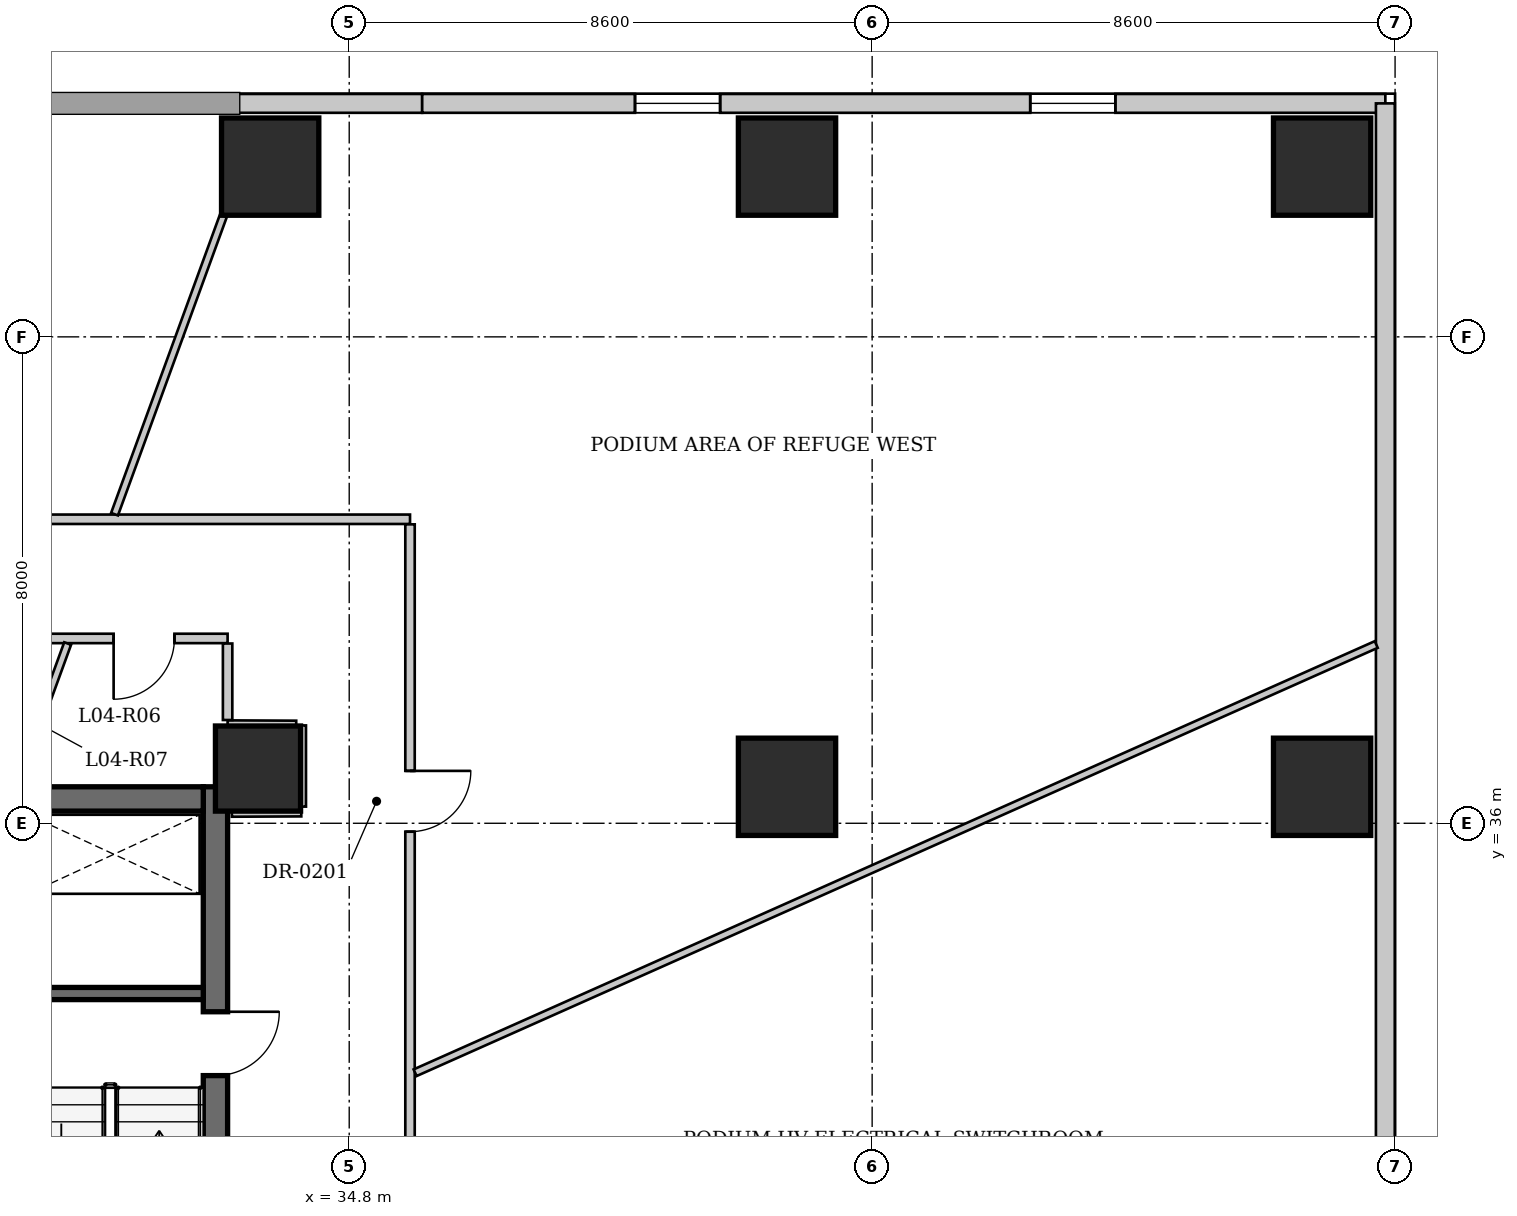
"""IFC4 building model, lengths in metres.
Left out: names, types, materials, properties, quantities, classifications, styles, units other than length and angle.
Written with IfcOpenShell. Run it as: python <this file> out.ifc"""

import sys

from ifc_helpers import new_model, si_unit, direction, frame, frame_2d, origin, origin_2d, place, context, subcontext, project, spatial, rectangle, extrude, source, transform, mapped, element, fill, save


model = new_model("IFC4")
c1 = context("Model", 3, precision=1e-05, world=origin(), true_north=direction((0.0, 1.0)))
c2 = subcontext(c1, "Body", "Model", "MODEL_VIEW")
j1 = project(units=[si_unit("LENGTHUNIT", "METRE"), si_unit("PLANEANGLEUNIT", "RADIAN")], contexts=[c1])
p1 = place(None, origin())
s1 = spatial("IfcSite", under=j1, at=p1, CompositionType="ELEMENT")
p2 = place(p1, origin())
s2 = spatial("IfcBuilding", under=s1, at=p2, CompositionType="ELEMENT")
p3 = place(p2, frame((0.0, 0.0, 19.0)))
s3 = spatial("IfcBuildingStorey", under=s2, at=p3, CompositionType="ELEMENT", Elevation=19.0)
for number, where, z_axis, x_axis in (
    (1, (50.8, 36.6, 0.0), (0.0, 0.0, 1.0), (1.0, 0.0, 0.0)),
    (2, (50.8, 46.8, 0.0), (0.0, 0.0, 1.0), (1.0, 0.0, 0.0)),
    (3, (33.5, 46.8, 0.0), (0.0, 0.0, 1.0), (1.0, 0.0, 0.0)),
    (4, (42.0, 46.8, 0.0), (0.0, 0.0, 1.0), (1.0, 0.0, 0.0)),
    (5, (42.0, 36.6, 0.0), (0.0, 0.0, 1.0), (1.0, 0.0, 0.0)),
):
    element("IfcColumn", number, at=place(p3, frame(where, z_axis=z_axis, x_axis=x_axis)), inside=s3, PredefinedType="COLUMN", context=c2, shape_type="SweptSolid", body=[
        extrude(rectangle(XDim=1.6, YDim=1.6, at=origin_2d()), origin(), (0.0, 0.0, 1.0), 4.55),
    ])
p4 = place(p3, frame((33.3, 36.9, 0.0), z_axis=(0.0, 0.0, 1.0), x_axis=(1.0, 0.0, 0.0)))
e6 = element("IfcColumn", 6, at=p4, inside=s3, PredefinedType="COLUMN", context=c2, shape_type="SweptSolid", body=[
    extrude(rectangle(XDim=1.4, YDim=1.4, at=origin_2d()), origin(), (0.0, 0.0, 1.0), 4.55),
])
p5 = place(p3, frame((18.0, 47.84, 0.0), z_axis=(0.0, 0.0, 1.0), x_axis=(1.0, 0.0, 0.0)))
e7 = element("IfcWall", 7, at=p5, inside=s3, PredefinedType="SOLIDWALL", context=c2, shape_type="SweptSolid", body=[
    extrude(rectangle(XDim=18.0, YDim=0.31, at=frame_2d((9.0, 0.0))), origin(), (0.0, 0.0, 1.0), 4.45),
])
p6 = place(p3, frame((36.0, 47.84, 0.0), z_axis=(0.0, 0.0, 1.0), x_axis=(1.0, 0.0, 0.0)))
e8 = element("IfcWall", 8, at=p6, inside=s3, PredefinedType="SOLIDWALL", context=c2, shape_type="SweptSolid", body=[
    extrude(rectangle(XDim=15.84, YDim=0.31, at=frame_2d((7.92, 0.0))), origin(), (0.0, 0.0, 1.0), 4.45),
])
p7 = place(p6, frame((3.5, 0.0, 0.95)))
e9 = element("IfcOpeningElement", 9, at=p7, cuts=e8, PredefinedType="OPENING", context=c2, shape_type="SweptSolid", body=[
    extrude(rectangle(XDim=1.4, YDim=2.2, at=frame_2d((0.7, 1.1))), frame((0.0, 0.165, 0.0), z_axis=(0.0, -1.0, 0.0), x_axis=(1.0, 0.0, 0.0)), (0.0, 0.0, 1.0), 0.33),
])
p8 = place(p6, frame((10.0, 0.0, 0.95)))
e10 = element("IfcOpeningElement", 10, at=p8, cuts=e8, PredefinedType="OPENING", context=c2, shape_type="SweptSolid", body=[
    extrude(rectangle(XDim=1.4, YDim=2.2, at=frame_2d((0.7, 1.1))), frame((0.0, 0.165, 0.0), z_axis=(0.0, -1.0, 0.0), x_axis=(1.0, 0.0, 0.0)), (0.0, 0.0, 1.0), 0.33),
])
p9 = place(p3, frame((51.84, 47.84, 0.0), z_axis=(0.0, 0.0, 1.0), x_axis=(0.0, -1.0, 0.0)))
e11 = element("IfcWall", 11, at=p9, inside=s3, PredefinedType="SOLIDWALL", context=c2, shape_type="SweptSolid", body=[
    extrude(rectangle(XDim=39.68, YDim=0.31, at=frame_2d((19.84, 0.0))), origin(), (0.0, 0.0, 1.0), 4.45),
])
p10 = place(p3, frame((32.6, 36.6, 0.0), z_axis=(0.0, 0.0, 1.0), x_axis=(0.0, -1.0, 0.0)))
e12 = element("IfcWall", 12, at=p10, inside=s3, PredefinedType="SHEAR", context=c2, shape_type="SweptSolid", body=[
    extrude(rectangle(XDim=10.8, YDim=0.4, at=frame_2d((5.4, 0.0))), origin(), (0.0, 0.0, 1.0), 5.0),
])
p11 = place(p10, frame((3.7, 0.0, 0.0)))
e13 = element("IfcOpeningElement", 13, at=p11, cuts=e12, PredefinedType="OPENING", context=c2, shape_type="SweptSolid", body=[
    extrude(rectangle(XDim=1.05, YDim=2.15, at=frame_2d((0.525, 1.075))), frame((0.0, 0.21, 0.0), z_axis=(0.0, -1.0, 0.0), x_axis=(1.0, 0.0, 0.0)), (0.0, 0.0, 1.0), 0.42),
])
p12 = place(p3, frame((19.6, 36.4, 0.0), z_axis=(0.0, 0.0, 1.0), x_axis=(1.0, 0.0, 0.0)))
e14 = element("IfcWall", 14, at=p12, inside=s3, PredefinedType="SHEAR", context=c2, shape_type="SweptSolid", body=[
    extrude(rectangle(XDim=12.8, YDim=0.4, at=frame_2d((6.4, 0.0))), origin(), (0.0, 0.0, 1.0), 5.0),
])
p13 = place(p3, frame((29.34, 33.2, 0.0), z_axis=(0.0, 0.0, 1.0), x_axis=(1.0, 0.0, 0.0)))
e15 = element("IfcWall", 15, at=p13, inside=s3, PredefinedType="SHEAR", context=c2, shape_type="SweptSolid", body=[
    extrude(rectangle(XDim=3.06, YDim=0.2, at=frame_2d((1.53, 0.0))), origin(), (0.0, 0.0, 1.0), 5.0),
])
p14 = place(p3, frame((32.8, 39.04, 0.0), z_axis=(0.0, 0.0, 1.0), x_axis=(-1.0, 0.0, 0.0)))
e16 = element("IfcWall", 16, at=p14, inside=s3, PredefinedType="PARTITIONING", context=c2, shape_type="SweptSolid", body=[
    extrude(rectangle(XDim=4.77, YDim=0.155, at=frame_2d((2.385, 0.0))), origin(), (0.0, 0.0, 1.0), 4.55),
])
p15 = place(p14, frame((0.875, 0.0, 0.0)))
e17 = element("IfcOpeningElement", 17, at=p15, cuts=e16, PredefinedType="OPENING", context=c2, shape_type="SweptSolid", body=[
    extrude(rectangle(XDim=1.0, YDim=2.15, at=frame_2d((0.5, 1.075))), frame((0.0, 0.087, 0.0), z_axis=(0.0, -1.0, 0.0), x_axis=(1.0, 0.0, 0.0)), (0.0, 0.0, 1.0), 0.175),
])
p16 = place(p14, frame((3.115, 0.0, 0.0)))
e18 = element("IfcOpeningElement", 18, at=p16, cuts=e16, PredefinedType="OPENING", context=c2, shape_type="SweptSolid", body=[
    extrude(rectangle(XDim=1.0, YDim=2.15, at=frame_2d((0.5, 1.075))), frame((0.0, 0.087, 0.0), z_axis=(0.0, -1.0, 0.0), x_axis=(1.0, 0.0, 0.0)), (0.0, 0.0, 1.0), 0.175),
])
p17 = place(p3, frame((21.6, 41.0, 0.0), z_axis=(0.0, 0.0, 1.0), x_axis=(1.0, 0.0, 0.0)))
e19 = element("IfcWall", 19, at=p17, inside=s3, PredefinedType="PARTITIONING", context=c2, shape_type="SweptSolid", body=[
    extrude(rectangle(XDim=14.2, YDim=0.155, at=frame_2d((7.1, 0.0))), origin(), (0.0, 0.0, 1.0), 4.55),
])
p18 = place(p17, frame((6.881, 0.0, 0.0)))
e20 = element("IfcOpeningElement", 20, at=p18, cuts=e19, PredefinedType="OPENING", context=c2, shape_type="SweptSolid", body=[
    extrude(rectangle(XDim=1.0, YDim=2.15, at=frame_2d((0.5, 1.075))), frame((0.0, 0.087, 0.0), z_axis=(0.0, -1.0, 0.0), x_axis=(1.0, 0.0, 0.0)), (0.0, 0.0, 1.0), 0.175),
])
p19 = place(p3, frame((35.8, 40.917, 0.0), z_axis=(0.0, 0.0, 1.0), x_axis=(0.0, -1.0, 0.0)))
e21 = element("IfcWall", 21, at=p19, inside=s3, PredefinedType="PARTITIONING", context=c2, shape_type="SweptSolid", body=[
    extrude(rectangle(XDim=14.796, YDim=0.155, at=frame_2d((7.398, 0.0))), origin(), (0.0, 0.0, 1.0), 4.55),
])
p20 = place(p19, frame((4.055, 0.0, 0.0)))
e22 = element("IfcOpeningElement", 22, at=p20, cuts=e21, PredefinedType="OPENING", context=c2, shape_type="SweptSolid", body=[
    extrude(rectangle(XDim=1.0, YDim=2.15, at=frame_2d((0.5, 1.075))), frame((0.0, 0.087, 0.0), z_axis=(0.0, -1.0, 0.0), x_axis=(1.0, 0.0, 0.0)), (0.0, 0.0, 1.0), 0.175),
])
p21 = place(p3, frame((32.87, 36.185, 0.0), z_axis=(0.0, 0.0, 1.0), x_axis=(0.999988932255, 0.00470482389, 0.0)))
e23 = element("IfcWall", 23, at=p21, inside=s3, PredefinedType="PARTITIONING", context=c2, shape_type="SweptSolid", body=[
    extrude(rectangle(XDim=1.142, YDim=0.155, at=frame_2d((0.571, 0.0))), origin(), (0.0, 0.0, 1.0), 4.55),
])
p22 = place(p3, frame((34.012, 36.274, 0.0), z_axis=(0.0, 0.0, 1.0), x_axis=(0.0, 1.0, 0.0)))
e24 = element("IfcWall", 24, at=p22, inside=s3, PredefinedType="PARTITIONING", context=c2, shape_type="SweptSolid", body=[
    extrude(rectangle(XDim=1.336, YDim=0.155, at=frame_2d((0.668, 0.0))), origin(), (0.0, 0.0, 1.0), 4.55),
])
p23 = place(p3, frame((33.928, 37.61, 0.0), z_axis=(0.0, 0.0, 1.0), x_axis=(-0.999989669582, 0.004545407589, 0.0)))
e25 = element("IfcWall", 25, at=p23, inside=s3, PredefinedType="PARTITIONING", context=c2, shape_type="SweptSolid", body=[
    extrude(rectangle(XDim=1.128, YDim=0.155, at=frame_2d((0.564, 0.0))), origin(), (0.0, 0.0, 1.0), 4.55),
])
p24 = place(p3, frame((32.8, 37.698, 0.0), z_axis=(0.0, 0.0, 1.0), x_axis=(0.0, 1.0, 0.0)))
e26 = element("IfcWall", 26, at=p24, inside=s3, PredefinedType="PARTITIONING", context=c2, shape_type="SweptSolid", body=[
    extrude(rectangle(XDim=1.258, YDim=0.155, at=frame_2d((0.629, 0.0))), origin(), (0.0, 0.0, 1.0), 4.55),
])
p25 = place(p3, frame((35.884, 31.897, 0.0), z_axis=(0.0, 0.0, 1.0), x_axis=(0.913432401088, 0.406990477336, 0.0)))
e27 = element("IfcWall", 27, at=p25, inside=s3, PredefinedType="PARTITIONING", context=c2, shape_type="SweptSolid", body=[
    extrude(rectangle(XDim=17.304, YDim=0.12, at=frame_2d((8.652, 0.0))), origin(), (0.0, 0.0, 1.0), 4.55),
])
p26 = place(p3, frame((30.94, 41.083, 0.0), z_axis=(0.0, 0.0, 1.0), x_axis=(0.34265121701, 0.939462688712, 0.0)))
e28 = element("IfcWall", 28, at=p26, inside=s3, PredefinedType="PARTITIONING", context=c2, shape_type="SweptSolid", body=[
    extrude(rectangle(XDim=5.223, YDim=0.12, at=frame_2d((2.611, 0.0))), origin(), (0.0, 0.0, 1.0), 4.55),
])
p27 = place(p3, frame((29.31, 36.6, 0.0), z_axis=(0.0, 0.0, 1.0), x_axis=(0.342618216876, 0.939474724229, 0.0)))
e29 = element("IfcWall", 29, at=p27, inside=s3, PredefinedType="PARTITIONING", context=c2, shape_type="SweptSolid", body=[
    extrude(rectangle(XDim=2.508, YDim=0.12, at=frame_2d((1.254, 0.0))), origin(), (0.0, 0.0, 1.0), 4.55),
])
m1 = source(origin(), c2, "Body", "SweptSolid", [
    extrude(rectangle(XDim=1.4, YDim=2.2, at=frame_2d((0.7, 1.1))), frame((0.0, 0.03, 0.0), z_axis=(0.0, -1.0, 0.0), x_axis=(1.0, 0.0, 0.0)), (0.0, 0.0, 1.0), 0.06),
])
p28 = place(p7, origin())
e30 = element("IfcWindow", 30, at=p28, inside=s3, PartitioningType="SINGLE_PANEL", PredefinedType="WINDOW", context=c2, shape_type="MappedRepresentation", body=[
    mapped(m1, transform((0.0, 0.0, 0.0), x_axis=(1.0, 0.0, 0.0), y_axis=(0.0, 1.0, 0.0), z_axis=(0.0, 0.0, 1.0), scale=1.0)),
])
fill(e9, e30)
p29 = place(p8, origin())
e31 = element("IfcWindow", 31, at=p29, inside=s3, PartitioningType="SINGLE_PANEL", PredefinedType="WINDOW", context=c2, shape_type="MappedRepresentation", body=[
    mapped(m1, transform((0.0, 0.0, 0.0), x_axis=(1.0, 0.0, 0.0), y_axis=(0.0, 1.0, 0.0), z_axis=(0.0, 0.0, 1.0), scale=1.0)),
])
fill(e10, e31)
m2 = source(origin(), c2, "Body", "SweptSolid", [
    extrude(rectangle(XDim=1.05, YDim=2.15, at=frame_2d((0.525, 1.075))), frame((0.0, 0.025, 0.0), z_axis=(0.0, -1.0, 0.0), x_axis=(1.0, 0.0, 0.0)), (0.0, 0.0, 1.0), 0.05),
])
p30 = place(p11, origin())
e32 = element("IfcDoor", 32, at=p30, inside=s3, OperationType="SINGLE_SWING_LEFT", PredefinedType="DOOR", context=c2, shape_type="MappedRepresentation", body=[
    mapped(m2, transform((0.0, 0.0, 0.0), x_axis=(1.0, 0.0, 0.0), y_axis=(0.0, 1.0, 0.0), z_axis=(0.0, 0.0, 1.0), scale=1.0)),
])
fill(e13, e32)
m3 = source(origin(), c2, "Body", "SweptSolid", [
    extrude(rectangle(XDim=1.0, YDim=2.15, at=frame_2d((0.5, 1.075))), frame((0.0, 0.025, 0.0), z_axis=(0.0, -1.0, 0.0), x_axis=(1.0, 0.0, 0.0)), (0.0, 0.0, 1.0), 0.05),
])
p31 = place(p15, origin())
e33 = element("IfcDoor", 33, at=p31, inside=s3, OperationType="SINGLE_SWING_RIGHT", PredefinedType="DOOR", context=c2, shape_type="MappedRepresentation", body=[
    mapped(m3, transform((0.0, 0.0, 0.0), x_axis=(1.0, 0.0, 0.0), y_axis=(0.0, 1.0, 0.0), z_axis=(0.0, 0.0, 1.0), scale=1.0)),
])
fill(e17, e33)
p32 = place(p20, origin())
e34 = element("IfcDoor", 34, at=p32, inside=s3, OperationType="SINGLE_SWING_LEFT", PredefinedType="DOOR", context=c2, shape_type="MappedRepresentation", body=[
    mapped(m3, transform((0.0, 0.0, 0.0), x_axis=(1.0, 0.0, 0.0), y_axis=(0.0, 1.0, 0.0), z_axis=(0.0, 0.0, 1.0), scale=1.0)),
])
fill(e22, e34)
save(model, sys.argv[1])
